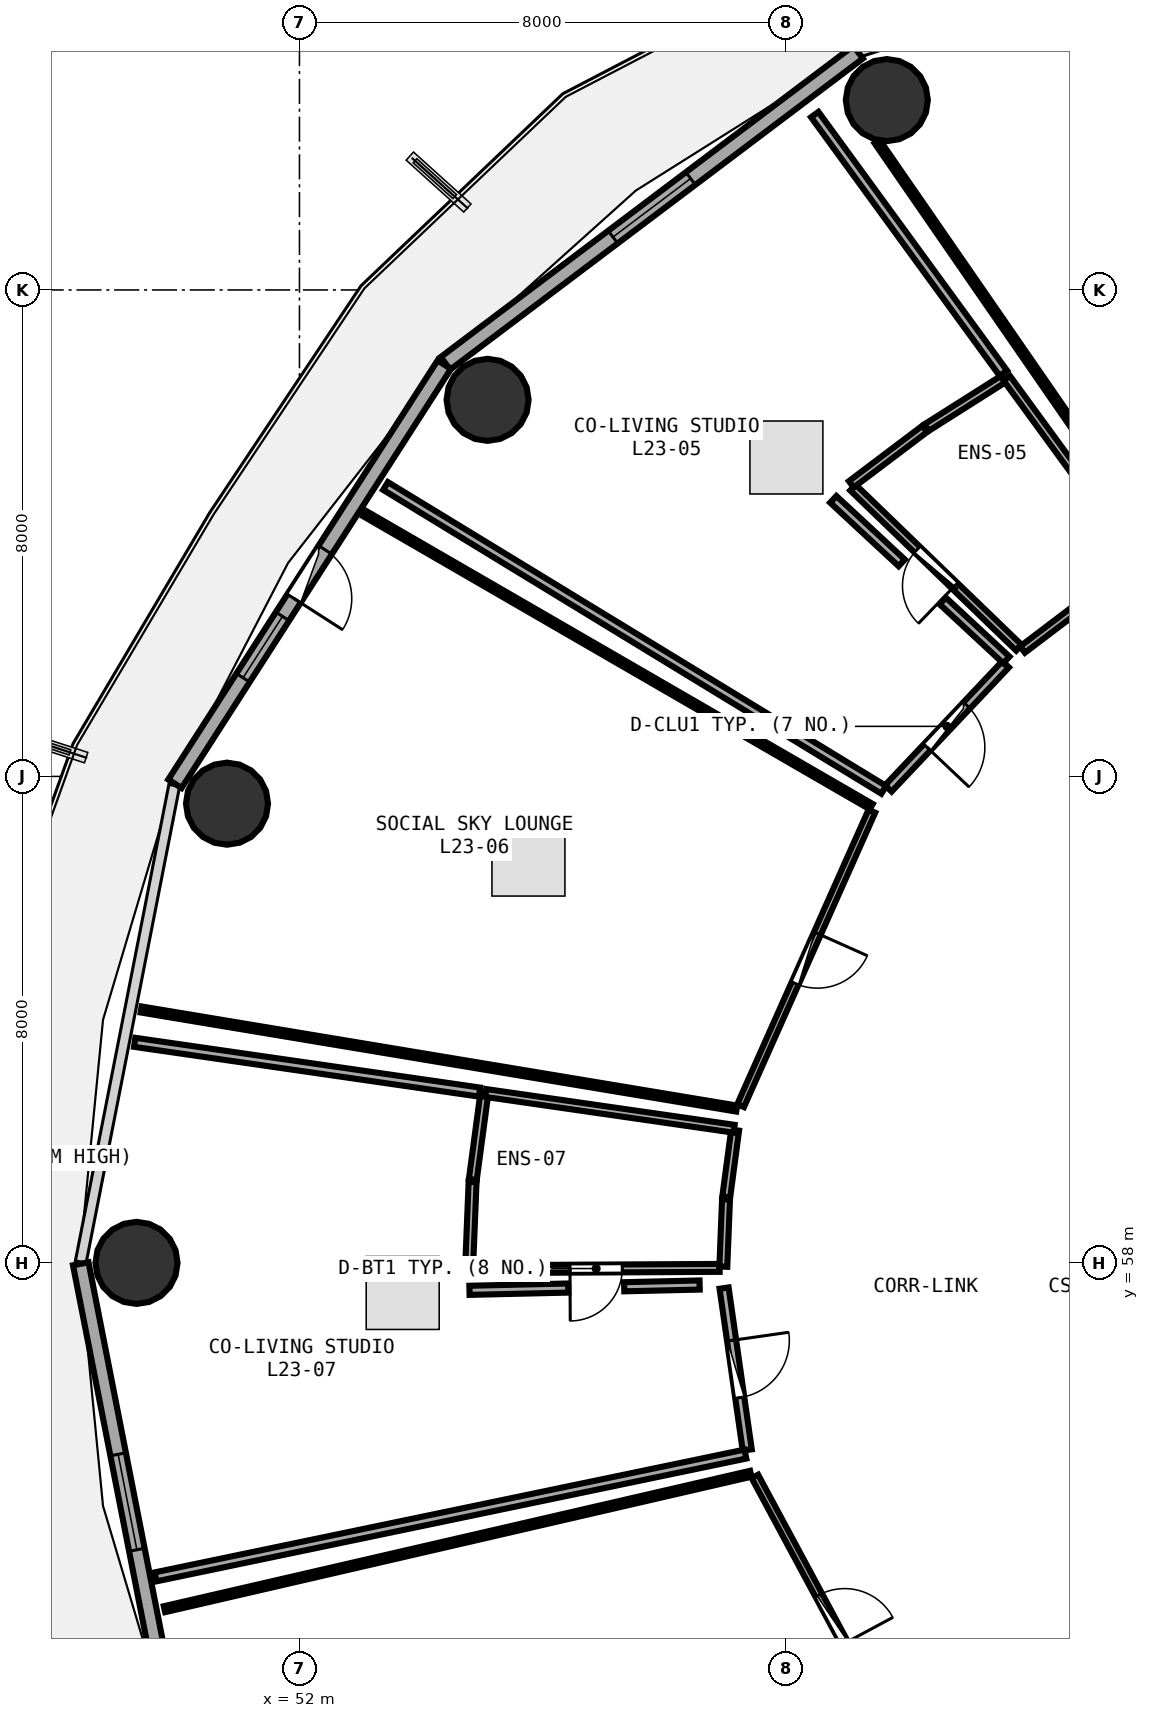
"""IFC4 building model, lengths in metres.
Left out: names, types, materials, properties, quantities, classifications, styles, units other than length and angle.
Written with IfcOpenShell. Run it as: python <this file> out.ifc"""

import sys

from ifc_helpers import new_model, si_unit, direction, frame, frame_2d, origin, origin_2d, place, context, subcontext, project, spatial, rectangle, circle, extrude, element, fill, save


model = new_model("IFC4")
c1 = context("Model", 3, precision=1e-05, world=origin(), true_north=direction((0.0, 1.0)))
c2 = subcontext(c1, "Body", "Model", "MODEL_VIEW")
j1 = project(units=[si_unit("LENGTHUNIT", "METRE"), si_unit("PLANEANGLEUNIT", "RADIAN")], contexts=[c1])
p1 = place(None, origin())
s1 = spatial("IfcSite", under=j1, at=p1, CompositionType="ELEMENT")
p2 = place(p1, origin())
s2 = spatial("IfcBuilding", under=s1, at=p2, CompositionType="ELEMENT")
p3 = place(p2, frame((0.0, 0.0, 91.35)))
s3 = spatial("IfcBuildingStorey", under=s2, at=p3, CompositionType="ELEMENT", Elevation=91.35)
for number, where, z_axis, x_axis in (
    (1, (61.66, 77.122, 0.0), (0.0, 0.0, 1.0), (1.0, 0.0, 0.0)),
    (2, (55.094, 72.193, 0.0), (0.0, 0.0, 1.0), (1.0, 0.0, 0.0)),
    (3, (50.808, 65.552, 0.0), (0.0, 0.0, 1.0), (1.0, 0.0, 0.0)),
    (4, (49.32, 58.0, 0.0), (0.0, 0.0, 1.0), (1.0, 0.0, 0.0)),
):
    element("IfcColumn", number, at=place(p3, frame(where, z_axis=z_axis, x_axis=x_axis)), inside=s3, PredefinedType="COLUMN", context=c2, shape_type="SweptSolid", body=[
        extrude(circle(Radius=0.675, at=origin_2d()), origin(), (0.0, 0.0, 1.0), 3.75),
    ])
p4 = place(p3, frame((61.188, 77.91, 0.0), z_axis=(0.0, 0.0, 1.0), x_axis=(-0.798501507879, -0.601992808857, 0.0)))
e5 = element("IfcWall", 5, at=p4, inside=s3, PredefinedType="SOLIDWALL", context=c2, shape_type="SweptSolid", body=[
    extrude(rectangle(XDim=8.499, YDim=0.26, at=frame_2d((4.25, 0.0))), origin(), (0.0, 0.0, 1.0), 3.475),
])
p5 = place(p4, frame((3.45, 0.0, 0.85)))
e6 = element("IfcOpeningElement", 6, at=p5, cuts=e5, PredefinedType="OPENING", context=c2, shape_type="SweptSolid", body=[
    extrude(rectangle(XDim=1.6, YDim=1.45, at=frame_2d((0.8, 0.725))), frame((0.0, 0.14, 0.0), z_axis=(0.0, -1.0, 0.0), x_axis=(1.0, 0.0, 0.0)), (0.0, 0.0, 1.0), 0.28),
])
p6 = place(p3, frame((54.381, 72.771, 0.0), z_axis=(0.0, 0.0, 1.0), x_axis=(-0.540620528459, -0.841266571432, 0.0)))
e7 = element("IfcWall", 7, at=p6, inside=s3, PredefinedType="SOLIDWALL", context=c2, shape_type="SweptSolid", body=[
    extrude(rectangle(XDim=8.193, YDim=0.26, at=frame_2d((4.096, 0.0))), origin(), (0.0, 0.0, 1.0), 3.475),
])
p7 = place(p6, frame((3.621, 0.0, 0.0)))
e8 = element("IfcOpeningElement", 8, at=p7, cuts=e7, PredefinedType="OPENING", context=c2, shape_type="SweptSolid", body=[
    extrude(rectangle(XDim=0.95, YDim=2.1, at=frame_2d((0.475, 1.05))), frame((0.0, 0.14, 0.0), z_axis=(0.0, -1.0, 0.0), x_axis=(1.0, 0.0, 0.0)), (0.0, 0.0, 1.0), 0.28),
])
p8 = place(p6, frame((4.921, 0.0, 0.85)))
e9 = element("IfcOpeningElement", 9, at=p8, cuts=e7, PredefinedType="OPENING", context=c2, shape_type="SweptSolid", body=[
    extrude(rectangle(XDim=1.2, YDim=1.45, at=frame_2d((0.6, 0.725))), frame((0.0, 0.14, 0.0), z_axis=(0.0, -1.0, 0.0), x_axis=(1.0, 0.0, 0.0)), (0.0, 0.0, 1.0), 0.28),
])
p9 = place(p3, frame((48.403, 57.985, 0.0), z_axis=(0.0, 0.0, 1.0), x_axis=(0.192581843632, -0.981280914674, 0.0)))
e10 = element("IfcWall", 10, at=p9, inside=s3, PredefinedType="SOLIDWALL", context=c2, shape_type="SweptSolid", body=[
    extrude(rectangle(XDim=7.987, YDim=0.26, at=frame_2d((3.993, 0.0))), origin(), (0.0, 0.0, 1.0), 3.475),
])
p10 = place(p9, frame((3.193, 0.0, 0.85)))
e11 = element("IfcOpeningElement", 11, at=p10, cuts=e10, PredefinedType="OPENING", context=c2, shape_type="SweptSolid", body=[
    extrude(rectangle(XDim=1.6, YDim=1.45, at=frame_2d((0.8, 0.725))), frame((0.0, 0.14, 0.0), z_axis=(0.0, -1.0, 0.0), x_axis=(1.0, 0.0, 0.0)), (0.0, 0.0, 1.0), 0.28),
])
p11 = place(p3, frame((63.833, 68.116, 0.0), z_axis=(0.0, 0.0, 1.0), x_axis=(-0.719513452588, 0.694478503299, 0.0)))
e12 = element("IfcWall", 12, at=p11, inside=s3, PredefinedType="PLUMBINGWALL", context=c2, shape_type="SweptSolid", body=[
    extrude(rectangle(XDim=3.793, YDim=0.13, at=frame_2d((1.897, 0.0))), origin(), (0.0, 0.0, 1.0), 3.175),
])
p12 = place(p11, frame((1.467, 0.0, 0.0)))
e13 = element("IfcOpeningElement", 13, at=p12, cuts=e12, PredefinedType="OPENING", context=c2, shape_type="SweptSolid", body=[
    extrude(rectangle(XDim=0.86, YDim=2.05, at=frame_2d((0.43, 1.025))), frame((0.0, 0.075, 0.0), z_axis=(0.0, -1.0, 0.0), x_axis=(1.0, 0.0, 0.0)), (0.0, 0.0, 1.0), 0.15),
])
p13 = place(p3, frame((63.614, 67.844, 0.0), z_axis=(0.0, 0.0, 1.0), x_axis=(-0.68683784084, -0.726810690889, 0.0)))
e14 = element("IfcWall", 14, at=p13, inside=s3, PredefinedType="PARTITIONING", context=c2, shape_type="SweptSolid", body=[
    extrude(rectangle(XDim=2.81, YDim=0.15, at=frame_2d((1.405, 0.0))), origin(), (0.0, 0.0, 1.0), 2.925),
])
p14 = place(p13, frame((0.93, 0.0, 0.0)))
e15 = element("IfcOpeningElement", 15, at=p14, cuts=e14, PredefinedType="OPENING", context=c2, shape_type="SweptSolid", body=[
    extrude(rectangle(XDim=0.95, YDim=2.08, at=frame_2d((0.475, 1.04))), frame((0.0, 0.085, 0.0), z_axis=(0.0, -1.0, 0.0), x_axis=(1.0, 0.0, 0.0)), (0.0, 0.0, 1.0), 0.17),
])
p15 = place(p3, frame((61.414, 65.428, 0.0), z_axis=(0.0, 0.0, 1.0), x_axis=(-0.407078232177, -0.913393295841, 0.0)))
e16 = element("IfcWall", 16, at=p15, inside=s3, PredefinedType="PARTITIONING", context=c2, shape_type="SweptSolid", body=[
    extrude(rectangle(XDim=5.302, YDim=0.12, at=frame_2d((2.651, 0.0))), origin(), (0.0, 0.0, 1.0), 2.925),
])
p16 = place(p15, frame((2.201, 0.0, 0.0)))
e17 = element("IfcOpeningElement", 17, at=p16, cuts=e16, PredefinedType="OPENING", context=c2, shape_type="SweptSolid", body=[
    extrude(rectangle(XDim=0.9, YDim=2.08, at=frame_2d((0.45, 1.04))), frame((0.0, 0.07, 0.0), z_axis=(0.0, -1.0, 0.0), x_axis=(1.0, 0.0, 0.0)), (0.0, 0.0, 1.0), 0.14),
])
p17 = place(p3, frame((58.91, 57.918, 0.0), z_axis=(0.0, 0.0, 1.0), x_axis=(-0.999986004608, -0.005290613143, 0.0)))
e18 = element("IfcWall", 18, at=p17, inside=s3, PredefinedType="PLUMBINGWALL", context=c2, shape_type="SweptSolid", body=[
    extrude(rectangle(XDim=4.061, YDim=0.13, at=frame_2d((2.03, 0.0))), origin(), (0.0, 0.0, 1.0), 2.925),
])
p18 = place(p17, frame((1.601, 0.0, 0.0)))
e19 = element("IfcOpeningElement", 19, at=p18, cuts=e18, PredefinedType="OPENING", context=c2, shape_type="SweptSolid", body=[
    extrude(rectangle(XDim=0.86, YDim=2.05, at=frame_2d((0.43, 1.025))), frame((0.0, 0.075, 0.0), z_axis=(0.0, -1.0, 0.0), x_axis=(1.0, 0.0, 0.0)), (0.0, 0.0, 1.0), 0.15),
])
p19 = place(p3, frame((58.983, 57.586, 0.0), z_axis=(0.0, 0.0, 1.0), x_axis=(0.141700939895, -0.989909512851, 0.0)))
e20 = element("IfcWall", 20, at=p19, inside=s3, PredefinedType="PARTITIONING", context=c2, shape_type="SweptSolid", body=[
    extrude(rectangle(XDim=2.689, YDim=0.15, at=frame_2d((1.345, 0.0))), origin(), (0.0, 0.0, 1.0), 3.48),
])
p20 = place(p19, frame((0.87, 0.0, 0.0)))
e21 = element("IfcOpeningElement", 21, at=p20, cuts=e20, PredefinedType="OPENING", context=c2, shape_type="SweptSolid", body=[
    extrude(rectangle(XDim=0.95, YDim=2.08, at=frame_2d((0.475, 1.04))), frame((0.0, 0.085, 0.0), z_axis=(0.0, -1.0, 0.0), x_axis=(1.0, 0.0, 0.0)), (0.0, 0.0, 1.0), 0.17),
])
p21 = place(p3, frame((59.49, 54.488, 0.0), z_axis=(0.0, 0.0, 1.0), x_axis=(0.473630069111, -0.880723882743, 0.0)))
e22 = element("IfcWall", 22, at=p21, inside=s3, PredefinedType="PARTITIONING", context=c2, shape_type="SweptSolid", body=[
    extrude(rectangle(XDim=5.332, YDim=0.12, at=frame_2d((2.666, 0.0))), origin(), (0.0, 0.0, 1.0), 2.925),
])
p22 = place(p21, frame((2.216, 0.0, 0.0)))
e23 = element("IfcOpeningElement", 23, at=p22, cuts=e22, PredefinedType="OPENING", context=c2, shape_type="SweptSolid", body=[
    extrude(rectangle(XDim=0.9, YDim=2.08, at=frame_2d((0.45, 1.04))), frame((0.0, 0.07, 0.0), z_axis=(0.0, -1.0, 0.0), x_axis=(1.0, 0.0, 0.0)), (0.0, 0.0, 1.0), 0.14),
])
p23 = place(p3, frame((66.169, 69.679, 0.0), z_axis=(0.0, 0.0, 1.0), x_axis=(-0.568250117639, 0.822855882766, 0.0)))
e24 = element("IfcWall", 24, at=p23, inside=s3, PredefinedType="PARTITIONING", context=c2, shape_type="SweptSolid", body=[
    extrude(rectangle(XDim=8.217, YDim=0.1, at=frame_2d((4.108, 0.0))), origin(), (0.0, 0.0, 1.0), 2.925),
])
p24 = place(p3, frame((64.83, 68.798, 0.0), z_axis=(0.0, 0.0, 1.0), x_axis=(-0.796729134499, -0.604336567022, 0.0)))
e25 = element("IfcWall", 25, at=p24, inside=s3, PredefinedType="PLUMBINGWALL", context=c2, shape_type="SweptSolid", body=[
    extrude(rectangle(XDim=1.177, YDim=0.13, at=frame_2d((0.589, 0.0))), origin(), (0.0, 0.0, 1.0), 2.925),
])
p25 = place(p3, frame((61.076, 70.804, 0.0), z_axis=(0.0, 0.0, 1.0), x_axis=(0.798136421733, 0.602476764949, 0.0)))
e26 = element("IfcWall", 26, at=p25, inside=s3, PredefinedType="PLUMBINGWALL", context=c2, shape_type="SweptSolid", body=[
    extrude(rectangle(XDim=1.512, YDim=0.13, at=frame_2d((0.756, 0.0))), origin(), (0.0, 0.0, 1.0), 3.48),
])
p26 = place(p3, frame((62.316, 71.738, 0.0), z_axis=(0.0, 0.0, 1.0), x_axis=(0.844925229622, 0.534884432703, 0.0)))
e27 = element("IfcWall", 27, at=p26, inside=s3, PredefinedType="PLUMBINGWALL", context=c2, shape_type="SweptSolid", body=[
    extrude(rectangle(XDim=1.524, YDim=0.13, at=frame_2d((0.762, 0.0))), origin(), (0.0, 0.0, 1.0), 2.925),
])
p27 = place(p3, frame((63.633, 72.548, 0.0), z_axis=(0.0, 0.0, 1.0), x_axis=(0.589656455867, -0.807654173551, 0.0)))
e28 = element("IfcWall", 28, at=p27, inside=s3, PredefinedType="PLUMBINGWALL", context=c2, shape_type="SweptSolid", body=[
    extrude(rectangle(XDim=3.791, YDim=0.13, at=frame_2d((1.896, 0.0))), origin(), (0.0, 0.0, 1.0), 3.175),
])
p28 = place(p3, frame((61.609, 65.78, 0.0), z_axis=(0.0, 0.0, 1.0), x_axis=(-0.853785143599, 0.520625516634, 0.0)))
e29 = element("IfcWall", 29, at=p28, inside=s3, PredefinedType="PARTITIONING", context=c2, shape_type="SweptSolid", body=[
    extrude(rectangle(XDim=9.597, YDim=0.15, at=frame_2d((4.798, 0.0))), origin(), (0.0, 0.0, 1.0), 2.975),
])
p29 = place(p3, frame((60.475, 76.885, 0.0), z_axis=(0.0, 0.0, 1.0), x_axis=(0.589128007392, -0.808039721119, 0.0)))
e30 = element("IfcWall", 30, at=p29, inside=s3, PredefinedType="PARTITIONING", context=c2, shape_type="SweptSolid", body=[
    extrude(rectangle(XDim=5.265, YDim=0.15, at=frame_2d((2.633, 0.0))), origin(), (0.0, 0.0, 1.0), 2.925),
])
p30 = place(p3, frame((60.779, 70.557, 0.0), z_axis=(0.0, 0.0, 1.0), x_axis=(0.732929378099, -0.680304730778, 0.0)))
e31 = element("IfcWall", 31, at=p30, inside=s3, PredefinedType="PARTITIONING", context=c2, shape_type="SweptSolid", body=[
    extrude(rectangle(XDim=1.536, YDim=0.15, at=frame_2d((0.768, 0.0))), origin(), (0.0, 0.0, 1.0), 3.175),
])
p31 = place(p3, frame((62.579, 68.886, 0.0), z_axis=(0.0, 0.0, 1.0), x_axis=(0.733037104662, -0.680188652646, 0.0)))
e32 = element("IfcWall", 32, at=p31, inside=s3, PredefinedType="PARTITIONING", context=c2, shape_type="SweptSolid", body=[
    extrude(rectangle(XDim=1.427, YDim=0.15, at=frame_2d((0.714, 0.0))), origin(), (0.0, 0.0, 1.0), 3.235),
])
p32 = place(p3, frame((59.191, 60.538, 0.0), z_axis=(0.0, 0.0, 1.0), x_axis=(-0.986439069388, 0.16412788424, 0.0)))
e33 = element("IfcWall", 33, at=p32, inside=s3, PredefinedType="PARTITIONING", context=c2, shape_type="SweptSolid", body=[
    extrude(rectangle(XDim=9.931, YDim=0.1, at=frame_2d((4.965, 0.0))), origin(), (0.0, 0.0, 1.0), 2.975),
])
p33 = place(p3, frame((53.073, 70.322, 0.0), z_axis=(0.0, 0.0, 1.0), x_axis=(0.865606852524, -0.500724252322, 0.0)))
e34 = element("IfcWall", 34, at=p33, inside=s3, PredefinedType="PARTITIONING", context=c2, shape_type="SweptSolid", body=[
    extrude(rectangle(XDim=9.624, YDim=0.1, at=frame_2d((4.812, 0.0))), origin(), (0.0, 0.0, 1.0), 2.975),
])
p34 = place(p3, frame((59.165, 60.183, 0.0), z_axis=(0.0, 0.0, 1.0), x_axis=(-0.132293485363, -0.991210590001, 0.0)))
e35 = element("IfcWall", 35, at=p34, inside=s3, PredefinedType="PLUMBINGWALL", context=c2, shape_type="SweptSolid", body=[
    extrude(rectangle(XDim=1.109, YDim=0.13, at=frame_2d((0.555, 0.0))), origin(), (0.0, 0.0, 1.0), 3.48),
])
p35 = place(p3, frame((59.015, 59.044, 0.0), z_axis=(0.0, 0.0, 1.0), x_axis=(-0.040144213929, -0.999193896142, 0.0)))
e36 = element("IfcWall", 36, at=p35, inside=s3, PredefinedType="PLUMBINGWALL", context=c2, shape_type="SweptSolid", body=[
    extrude(rectangle(XDim=1.107, YDim=0.13, at=frame_2d((0.553, 0.0))), origin(), (0.0, 0.0, 1.0), 2.925),
])
p36 = place(p3, frame((54.79, 57.916, 0.0), z_axis=(0.0, 0.0, 1.0), x_axis=(0.040511918217, 0.999179055266, 0.0)))
e37 = element("IfcWall", 37, at=p36, inside=s3, PredefinedType="PLUMBINGWALL", context=c2, shape_type="SweptSolid", body=[
    extrude(rectangle(XDim=1.416, YDim=0.13, at=frame_2d((0.708, 0.0))), origin(), (0.0, 0.0, 1.0), 2.925),
])
p37 = place(p3, frame((54.851, 59.371, 0.0), z_axis=(0.0, 0.0, 1.0), x_axis=(0.133008986947, 0.991114831587, 0.0)))
e38 = element("IfcWall", 38, at=p37, inside=s3, PredefinedType="PLUMBINGWALL", context=c2, shape_type="SweptSolid", body=[
    extrude(rectangle(XDim=1.419, YDim=0.13, at=frame_2d((0.709, 0.0))), origin(), (0.0, 0.0, 1.0), 3.48),
])
p38 = place(p3, frame((55.062, 60.794, 0.0), z_axis=(0.0, 0.0, 1.0), x_axis=(0.989792775484, -0.142514075094, 0.0)))
e39 = element("IfcWall", 39, at=p38, inside=s3, PredefinedType="PLUMBINGWALL", context=c2, shape_type="SweptSolid", body=[
    extrude(rectangle(XDim=4.129, YDim=0.13, at=frame_2d((2.064, 0.0))), origin(), (0.0, 0.0, 1.0), 3.175),
])
p39 = place(p3, frame((59.334, 54.856, 0.0), z_axis=(0.0, 0.0, 1.0), x_axis=(-0.979013610983, -0.203794871157, 0.0)))
e40 = element("IfcWall", 40, at=p39, inside=s3, PredefinedType="PARTITIONING", context=c2, shape_type="SweptSolid", body=[
    extrude(rectangle(XDim=9.91, YDim=0.15, at=frame_2d((4.955, 0.0))), origin(), (0.0, 0.0, 1.0), 2.975),
])
p40 = place(p3, frame((49.29, 61.627, 0.0), z_axis=(0.0, 0.0, 1.0), x_axis=(0.989748303042, -0.142822605444, 0.0)))
e41 = element("IfcWall", 41, at=p40, inside=s3, PredefinedType="PARTITIONING", context=c2, shape_type="SweptSolid", body=[
    extrude(rectangle(XDim=5.732, YDim=0.15, at=frame_2d((2.866, 0.0))), origin(), (0.0, 0.0, 1.0), 2.975),
])
p41 = place(p3, frame((54.796, 57.549, 0.0), z_axis=(0.0, 0.0, 1.0), x_axis=(0.999735829312, 0.022984159562, 0.0)))
e42 = element("IfcWall", 42, at=p41, inside=s3, PredefinedType="PARTITIONING", context=c2, shape_type="SweptSolid", body=[
    extrude(rectangle(XDim=1.625, YDim=0.15, at=frame_2d((0.812, 0.0))), origin(), (0.0, 0.0, 1.0), 3.175),
])
p42 = place(p3, frame((57.341, 57.607, 0.0), z_axis=(0.0, 0.0, 1.0), x_axis=(0.999735089114, 0.02301633322, 0.0)))
e43 = element("IfcWall", 43, at=p42, inside=s3, PredefinedType="PARTITIONING", context=c2, shape_type="SweptSolid", body=[
    extrude(rectangle(XDim=1.241, YDim=0.15, at=frame_2d((0.621, 0.0))), origin(), (0.0, 0.0, 1.0), 3.48),
])
p43 = place(p3, frame((49.78, 52.305, 0.0), z_axis=(0.0, 0.0, 1.0), x_axis=(0.9743529317, 0.225025252999, 0.0)))
e44 = element("IfcWall", 44, at=p43, inside=s3, PredefinedType="PARTITIONING", context=c2, shape_type="SweptSolid", body=[
    extrude(rectangle(XDim=9.897, YDim=0.1, at=frame_2d((4.948, 0.0))), origin(), (0.0, 0.0, 1.0), 2.975),
])
p44 = place(p5, origin())
e45 = element("IfcWindow", 45, at=p44, inside=s3, PartitioningType="SINGLE_PANEL", PredefinedType="WINDOW", context=c2, shape_type="SweptSolid", body=[
    extrude(rectangle(XDim=1.6, YDim=1.45, at=frame_2d((0.8, 0.725))), frame((0.0, 0.03, 0.0), z_axis=(0.0, -1.0, 0.0), x_axis=(1.0, 0.0, 0.0)), (0.0, 0.0, 1.0), 0.06),
])
fill(e6, e45)
p45 = place(p7, frame((0.95, 0.0, 0.0), z_axis=(0.0, 0.0, 1.0), x_axis=(-1.0, 0.0, 0.0)))
e46 = element("IfcDoor", 46, at=p45, inside=s3, OperationType="SINGLE_SWING_LEFT", PredefinedType="DOOR", context=c2, shape_type="SweptSolid", body=[
    extrude(rectangle(XDim=0.95, YDim=2.1, at=frame_2d((0.475, 1.05))), frame((0.0, 0.025, 0.0), z_axis=(0.0, -1.0, 0.0), x_axis=(1.0, 0.0, 0.0)), (0.0, 0.0, 1.0), 0.05),
])
fill(e8, e46)
p46 = place(p8, origin())
e47 = element("IfcWindow", 47, at=p46, inside=s3, PartitioningType="SINGLE_PANEL", PredefinedType="WINDOW", context=c2, shape_type="SweptSolid", body=[
    extrude(rectangle(XDim=1.2, YDim=1.45, at=frame_2d((0.6, 0.725))), frame((0.0, 0.03, 0.0), z_axis=(0.0, -1.0, 0.0), x_axis=(1.0, 0.0, 0.0)), (0.0, 0.0, 1.0), 0.06),
])
fill(e9, e47)
p47 = place(p10, origin())
e48 = element("IfcWindow", 48, at=p47, inside=s3, PartitioningType="SINGLE_PANEL", PredefinedType="WINDOW", context=c2, shape_type="SweptSolid", body=[
    extrude(rectangle(XDim=1.6, YDim=1.45, at=frame_2d((0.8, 0.725))), frame((0.0, 0.03, 0.0), z_axis=(0.0, -1.0, 0.0), x_axis=(1.0, 0.0, 0.0)), (0.0, 0.0, 1.0), 0.06),
])
fill(e11, e48)
p48 = place(p12, origin())
e49 = element("IfcDoor", 49, at=p48, inside=s3, OperationType="SINGLE_SWING_LEFT", PredefinedType="DOOR", context=c2, shape_type="SweptSolid", body=[
    extrude(rectangle(XDim=0.86, YDim=2.05, at=frame_2d((0.43, 1.025))), frame((0.0, 0.025, 0.0), z_axis=(0.0, -1.0, 0.0), x_axis=(1.0, 0.0, 0.0)), (0.0, 0.0, 1.0), 0.05),
])
fill(e13, e49)
p49 = place(p14, origin())
e50 = element("IfcDoor", 50, at=p49, inside=s3, OperationType="SINGLE_SWING_RIGHT", PredefinedType="DOOR", context=c2, shape_type="SweptSolid", body=[
    extrude(rectangle(XDim=0.95, YDim=2.08, at=frame_2d((0.475, 1.04))), frame((0.0, 0.025, 0.0), z_axis=(0.0, -1.0, 0.0), x_axis=(1.0, 0.0, 0.0)), (0.0, 0.0, 1.0), 0.05),
])
fill(e15, e50)
p50 = place(p16, origin())
e51 = element("IfcDoor", 51, at=p50, inside=s3, OperationType="SINGLE_SWING_LEFT", PredefinedType="DOOR", context=c2, shape_type="SweptSolid", body=[
    extrude(rectangle(XDim=0.9, YDim=2.08, at=frame_2d((0.45, 1.04))), frame((0.0, 0.025, 0.0), z_axis=(0.0, -1.0, 0.0), x_axis=(1.0, 0.0, 0.0)), (0.0, 0.0, 1.0), 0.05),
])
fill(e17, e51)
p51 = place(p18, origin())
e52 = element("IfcDoor", 52, at=p51, inside=s3, OperationType="SINGLE_SWING_RIGHT", PredefinedType="DOOR", context=c2, shape_type="SweptSolid", body=[
    extrude(rectangle(XDim=0.86, YDim=2.05, at=frame_2d((0.43, 1.025))), frame((0.0, 0.025, 0.0), z_axis=(0.0, -1.0, 0.0), x_axis=(1.0, 0.0, 0.0)), (0.0, 0.0, 1.0), 0.05),
])
fill(e19, e52)
p52 = place(p20, origin())
e53 = element("IfcDoor", 53, at=p52, inside=s3, OperationType="SINGLE_SWING_LEFT", PredefinedType="DOOR", context=c2, shape_type="SweptSolid", body=[
    extrude(rectangle(XDim=0.95, YDim=2.08, at=frame_2d((0.475, 1.04))), frame((0.0, 0.025, 0.0), z_axis=(0.0, -1.0, 0.0), x_axis=(1.0, 0.0, 0.0)), (0.0, 0.0, 1.0), 0.05),
])
fill(e21, e53)
p53 = place(p22, origin())
e54 = element("IfcDoor", 54, at=p53, inside=s3, OperationType="SINGLE_SWING_RIGHT", PredefinedType="DOOR", context=c2, shape_type="SweptSolid", body=[
    extrude(rectangle(XDim=0.9, YDim=2.08, at=frame_2d((0.45, 1.04))), frame((0.0, 0.025, 0.0), z_axis=(0.0, -1.0, 0.0), x_axis=(1.0, 0.0, 0.0)), (0.0, 0.0, 1.0), 0.05),
])
fill(e23, e54)
save(model, sys.argv[1])
